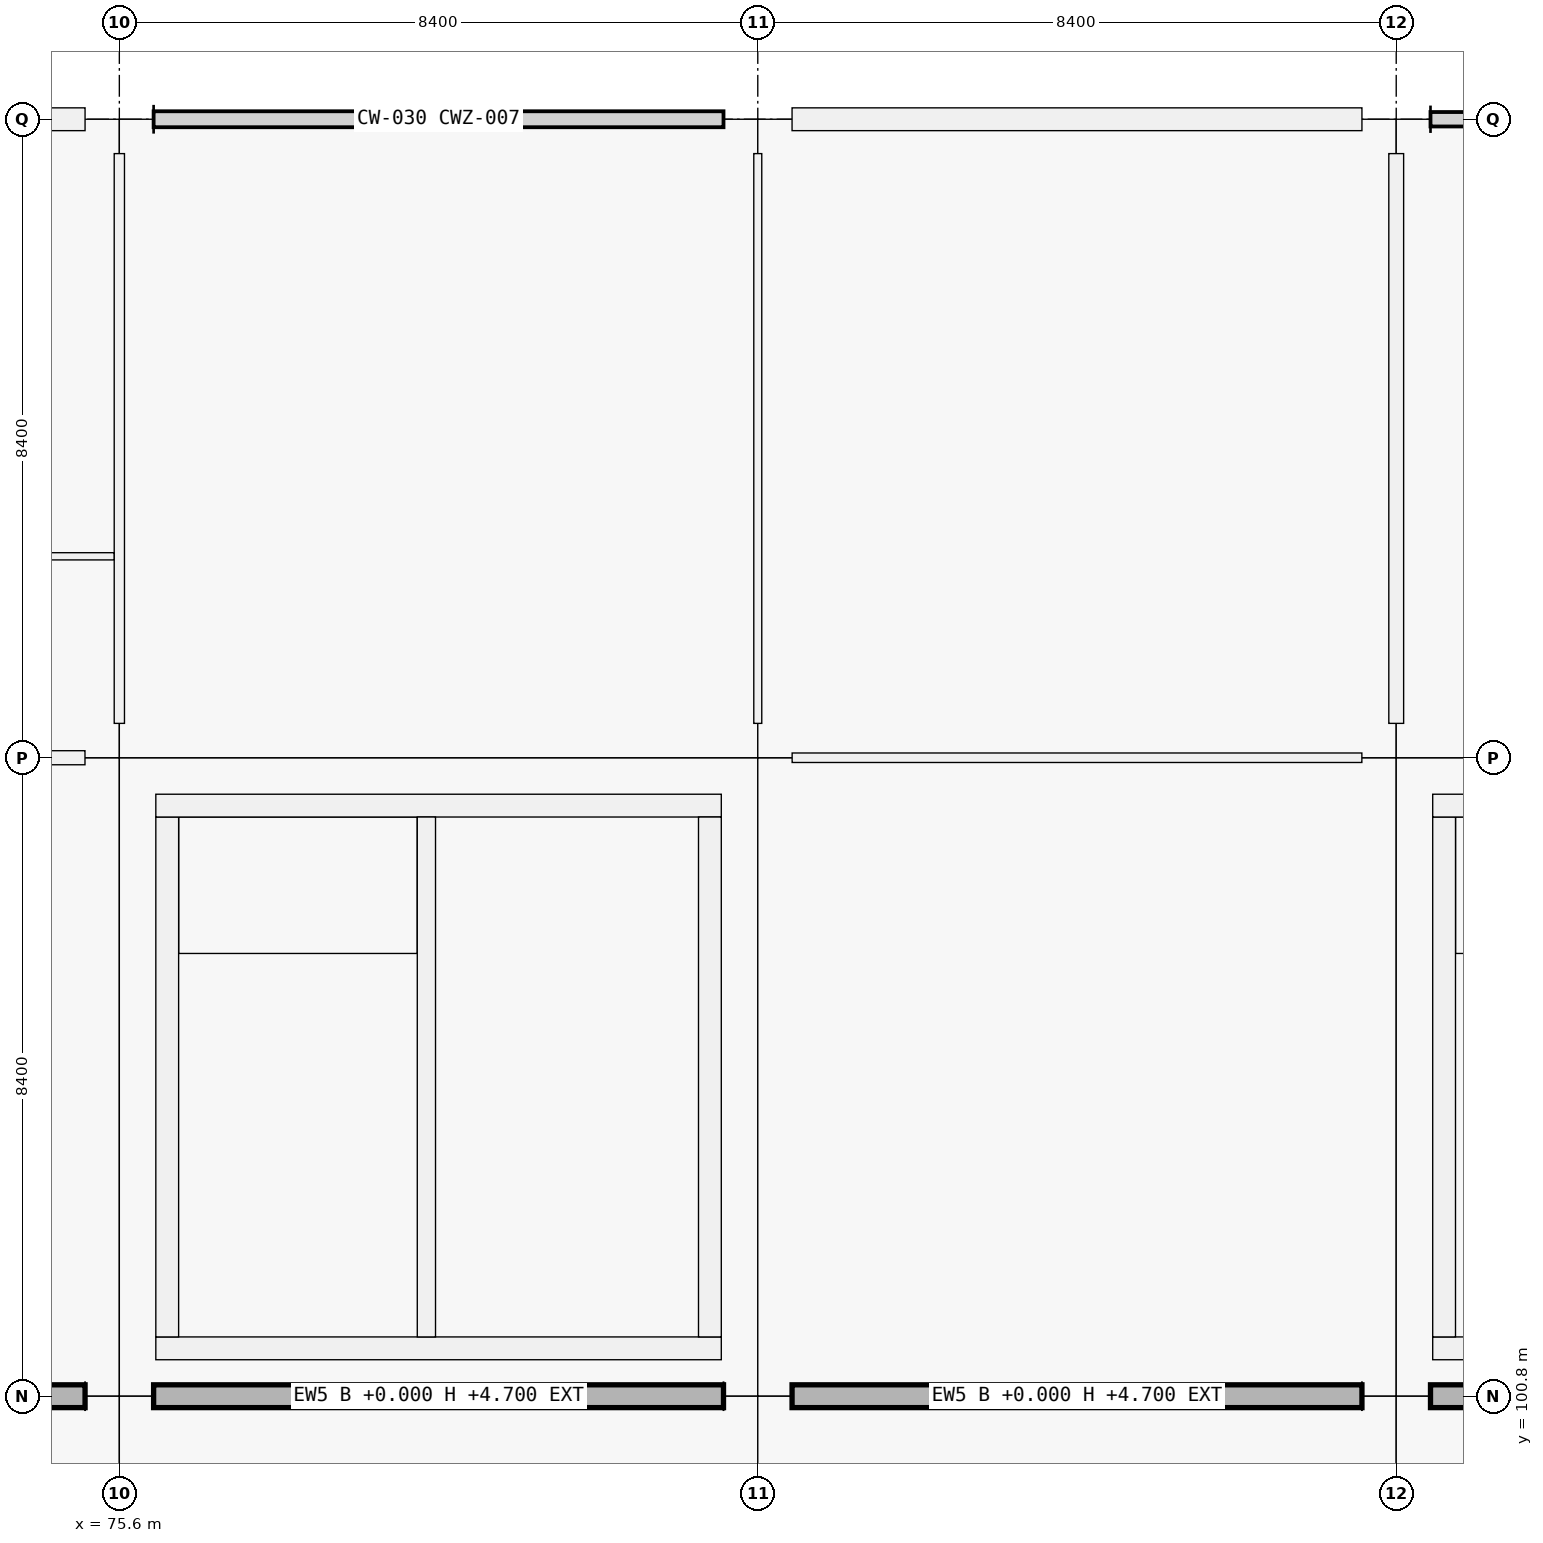
"""IFC4 building model, lengths in metres.
Left out: names, types, materials, properties, quantities, classifications, styles, units other than length and angle.
Written with IfcOpenShell. Run it as: python <this file> out.ifc"""

import sys

from ifc_helpers import new_model, si_unit, direction, frame, frame_2d, origin, origin_2d, place, context, subcontext, project, spatial, rectangle, extrude, element, fill, save


model = new_model("IFC4")
c1 = context("Model", 3, precision=1e-05, world=origin(), true_north=direction((0.0, 1.0)))
c2 = subcontext(c1, "Body", "Model", "MODEL_VIEW")
j1 = project(units=[si_unit("LENGTHUNIT", "METRE"), si_unit("PLANEANGLEUNIT", "RADIAN")], contexts=[c1])
p1 = place(None, origin())
s1 = spatial("IfcSite", under=j1, at=p1, CompositionType="ELEMENT")
p2 = place(p1, origin())
s2 = spatial("IfcBuilding", under=s1, at=p2, CompositionType="ELEMENT")
p3 = place(p2, origin())
s3 = spatial("IfcBuildingStorey", under=s2, at=p3, CompositionType="ELEMENT", Elevation=0.0)
for number, where, z_axis, x_axis in (
    (1, (75.6, 100.8, 0.0), (0.0, 0.0, 1.0), (1.0, 0.0, 0.0)),
    (2, (75.6, 109.2, 0.0), (0.0, 0.0, 1.0), (1.0, 0.0, 0.0)),
    (3, (75.6, 117.6, 0.0), (0.0, 0.0, 1.0), (1.0, 0.0, 0.0)),
    (4, (84.0, 100.8, 0.0), (0.0, 0.0, 1.0), (1.0, 0.0, 0.0)),
    (5, (84.0, 109.2, 0.0), (0.0, 0.0, 1.0), (1.0, 0.0, 0.0)),
    (6, (84.0, 117.6, 0.0), (0.0, 0.0, 1.0), (1.0, 0.0, 0.0)),
    (7, (92.4, 100.8, 0.0), (0.0, 0.0, 1.0), (1.0, 0.0, 0.0)),
    (8, (92.4, 109.2, 0.0), (0.0, 0.0, 1.0), (1.0, 0.0, 0.0)),
    (9, (92.4, 117.6, 0.0), (0.0, 0.0, 1.0), (1.0, 0.0, 0.0)),
):
    element("IfcColumn", number, at=place(p3, frame(where, z_axis=z_axis, x_axis=x_axis)), inside=s3, PredefinedType="COLUMN", context=c2, shape_type="SweptSolid", body=[
        extrude(rectangle(XDim=0.9, YDim=0.9, at=origin_2d()), origin(), (0.0, 0.0, 1.0), 5.76),
    ])
p4 = place(p3, frame((75.149, 100.8, 0.0), z_axis=(0.0, 0.0, 1.0), x_axis=(-1.0, 0.0, 0.0)))
e10 = element("IfcWall", 10, at=p4, inside=s3, PredefinedType="SOLIDWALL", context=c2, shape_type="SweptSolid", body=[
    extrude(rectangle(XDim=7.498, YDim=0.3, at=frame_2d((3.749, 0.0))), origin(), (0.0, 0.0, 1.0), 4.7),
])
p5 = place(p4, frame((3.199, 0.0, 0.9)))
e11 = element("IfcOpeningElement", 11, at=p5, cuts=e10, PredefinedType="OPENING", context=c2, shape_type="SweptSolid", body=[
    extrude(rectangle(XDim=1.1, YDim=1.5, at=frame_2d((0.55, 0.75))), frame((0.0, 0.15, 0.0), z_axis=(0.0, -1.0, 0.0), x_axis=(1.0, 0.0, 0.0)), (0.0, 0.0, 1.0), 0.3),
])
p6 = place(p3, frame((67.651, 117.6, 0.0), z_axis=(0.0, 0.0, 1.0), x_axis=(1.0, 0.0, 0.0)))
e12 = element("IfcWall", 12, at=p6, inside=s3, PredefinedType="SOLIDWALL", context=c2, shape_type="SweptSolid", body=[
    extrude(rectangle(XDim=7.498, YDim=0.3, at=frame_2d((3.749, 0.0))), origin(), (0.0, 0.0, 1.0), 4.7),
])
p7 = place(p6, frame((2.999, 0.0, 0.9)))
e13 = element("IfcOpeningElement", 13, at=p7, cuts=e12, PredefinedType="OPENING", context=c2, shape_type="SweptSolid", body=[
    extrude(rectangle(XDim=1.5, YDim=1.2, at=frame_2d((0.75, 0.6))), frame((0.0, 0.15, 0.0), z_axis=(0.0, -1.0, 0.0), x_axis=(1.0, 0.0, 0.0)), (0.0, 0.0, 1.0), 0.3),
])
p8 = place(p3, frame((83.549, 100.8, 0.0), z_axis=(0.0, 0.0, 1.0), x_axis=(-1.0, 0.0, 0.0)))
e14 = element("IfcWall", 14, at=p8, inside=s3, PredefinedType="SOLIDWALL", context=c2, shape_type="SweptSolid", body=[
    extrude(rectangle(XDim=7.498, YDim=0.3, at=frame_2d((3.749, 0.0))), origin(), (0.0, 0.0, 1.0), 4.7),
])
p9 = place(p3, frame((91.949, 100.8, 0.0), z_axis=(0.0, 0.0, 1.0), x_axis=(-1.0, 0.0, 0.0)))
e15 = element("IfcWall", 15, at=p9, inside=s3, PredefinedType="SOLIDWALL", context=c2, shape_type="SweptSolid", body=[
    extrude(rectangle(XDim=7.498, YDim=0.3, at=frame_2d((3.749, 0.0))), origin(), (0.0, 0.0, 1.0), 4.7),
])
p10 = place(p9, frame((2.899, 0.0, 0.9)))
e16 = element("IfcOpeningElement", 16, at=p10, cuts=e15, PredefinedType="OPENING", context=c2, shape_type="SweptSolid", body=[
    extrude(rectangle(XDim=1.7, YDim=1.85, at=frame_2d((0.85, 0.925))), frame((0.0, 0.15, 0.0), z_axis=(0.0, -1.0, 0.0), x_axis=(1.0, 0.0, 0.0)), (0.0, 0.0, 1.0), 0.3),
])
p11 = place(p3, frame((84.451, 117.6, 0.0), z_axis=(0.0, 0.0, 1.0), x_axis=(1.0, 0.0, 0.0)))
e17 = element("IfcWall", 17, at=p11, inside=s3, PredefinedType="SOLIDWALL", context=c2, shape_type="SweptSolid", body=[
    extrude(rectangle(XDim=7.498, YDim=0.3, at=frame_2d((3.749, 0.0))), origin(), (0.0, 0.0, 1.0), 4.7),
])
p12 = place(p11, frame((2.599, 0.0, 0.0)))
e18 = element("IfcOpeningElement", 18, at=p12, cuts=e17, PredefinedType="OPENING", context=c2, shape_type="SweptSolid", body=[
    extrude(rectangle(XDim=2.3, YDim=2.3, at=frame_2d((1.15, 1.15))), frame((0.0, 0.15, 0.0), z_axis=(0.0, -1.0, 0.0), x_axis=(1.0, 0.0, 0.0)), (0.0, 0.0, 1.0), 0.3),
])
p13 = place(p3, frame((100.349, 100.8, 0.0), z_axis=(0.0, 0.0, 1.0), x_axis=(-1.0, 0.0, 0.0)))
e19 = element("IfcWall", 19, at=p13, inside=s3, PredefinedType="SOLIDWALL", context=c2, shape_type="SweptSolid", body=[
    extrude(rectangle(XDim=7.498, YDim=0.3, at=frame_2d((3.749, 0.0))), origin(), (0.0, 0.0, 1.0), 4.7),
])
p14 = place(p3, frame((83.52, 101.43, 0.0), z_axis=(0.0, 0.0, 1.0), x_axis=(-1.0, 0.0, 0.0)))
e20 = element("IfcWall", 20, at=p14, inside=s3, PredefinedType="SHEAR", context=c2, shape_type="SweptSolid", body=[
    extrude(rectangle(XDim=7.44, YDim=0.3, at=frame_2d((3.72, 0.0))), origin(), (0.0, 0.0, 1.0), 5.76),
])
p15 = place(p3, frame((76.23, 101.58, 0.0), z_axis=(0.0, 0.0, 1.0), x_axis=(0.0, 1.0, 0.0)))
e21 = element("IfcWall", 21, at=p15, inside=s3, PredefinedType="SHEAR", context=c2, shape_type="SweptSolid", body=[
    extrude(rectangle(XDim=6.84, YDim=0.3, at=frame_2d((3.42, 0.0))), origin(), (0.0, 0.0, 1.0), 5.76),
])
p16 = place(p3, frame((76.08, 108.57, 0.0), z_axis=(0.0, 0.0, 1.0), x_axis=(1.0, 0.0, 0.0)))
e22 = element("IfcWall", 22, at=p16, inside=s3, PredefinedType="SHEAR", context=c2, shape_type="SweptSolid", body=[
    extrude(rectangle(XDim=7.44, YDim=0.3, at=frame_2d((3.72, 0.0))), origin(), (0.0, 0.0, 1.0), 5.76),
])
p17 = place(p3, frame((83.37, 108.42, 0.0), z_axis=(0.0, 0.0, 1.0), x_axis=(0.0, -1.0, 0.0)))
e23 = element("IfcWall", 23, at=p17, inside=s3, PredefinedType="SHEAR", context=c2, shape_type="SweptSolid", body=[
    extrude(rectangle(XDim=6.84, YDim=0.3, at=frame_2d((3.42, 0.0))), origin(), (0.0, 0.0, 1.0), 5.76),
])
p18 = place(p17, frame((3.97, 0.0, 0.0)))
e24 = element("IfcOpeningElement", 24, at=p18, cuts=e23, PredefinedType="OPENING", context=c2, shape_type="SweptSolid", body=[
    extrude(rectangle(XDim=1.5, YDim=2.15, at=frame_2d((0.75, 1.075))), frame((0.0, 0.15, 0.0), z_axis=(0.0, -1.0, 0.0), x_axis=(1.0, 0.0, 0.0)), (0.0, 0.0, 1.0), 0.3),
])
p19 = place(p3, frame((79.64, 101.58, 0.0), z_axis=(0.0, 0.0, 1.0), x_axis=(0.0, 1.0, 0.0)))
e25 = element("IfcWall", 25, at=p19, inside=s3, PredefinedType="SHEAR", context=c2, shape_type="SweptSolid", body=[
    extrude(rectangle(XDim=6.84, YDim=0.24, at=frame_2d((3.42, 0.0))), origin(), (0.0, 0.0, 1.0), 5.76),
])
p20 = place(p19, frame((0.12, 0.0, 0.0)))
e26 = element("IfcOpeningElement", 26, at=p20, cuts=e25, PredefinedType="OPENING", context=c2, shape_type="SweptSolid", body=[
    extrude(rectangle(XDim=1.0, YDim=2.15, at=frame_2d((0.5, 1.075))), frame((0.0, 0.12, 0.0), z_axis=(0.0, -1.0, 0.0), x_axis=(1.0, 0.0, 0.0)), (0.0, 0.0, 1.0), 0.24),
])
p21 = place(p3, frame((100.32, 101.43, 0.0), z_axis=(0.0, 0.0, 1.0), x_axis=(-1.0, 0.0, 0.0)))
e27 = element("IfcWall", 27, at=p21, inside=s3, PredefinedType="SHEAR", context=c2, shape_type="SweptSolid", body=[
    extrude(rectangle(XDim=7.44, YDim=0.3, at=frame_2d((3.72, 0.0))), origin(), (0.0, 0.0, 1.0), 5.76),
])
p22 = place(p3, frame((93.03, 101.58, 0.0), z_axis=(0.0, 0.0, 1.0), x_axis=(0.0, 1.0, 0.0)))
e28 = element("IfcWall", 28, at=p22, inside=s3, PredefinedType="SHEAR", context=c2, shape_type="SweptSolid", body=[
    extrude(rectangle(XDim=6.84, YDim=0.3, at=frame_2d((3.42, 0.0))), origin(), (0.0, 0.0, 1.0), 5.76),
])
p23 = place(p3, frame((92.88, 108.57, 0.0), z_axis=(0.0, 0.0, 1.0), x_axis=(1.0, 0.0, 0.0)))
e29 = element("IfcWall", 29, at=p23, inside=s3, PredefinedType="SHEAR", context=c2, shape_type="SweptSolid", body=[
    extrude(rectangle(XDim=7.44, YDim=0.3, at=frame_2d((3.72, 0.0))), origin(), (0.0, 0.0, 1.0), 5.76),
])
p24 = place(p3, frame((67.652, 109.2, 0.0), z_axis=(0.0, 0.0, 1.0), x_axis=(1.0, 0.0, 0.0)))
e30 = element("IfcWall", 30, at=p24, inside=s3, PredefinedType="PARTITIONING", context=c2, shape_type="SweptSolid", body=[
    extrude(rectangle(XDim=7.496, YDim=0.185, at=frame_2d((3.748, 0.0))), origin(), (0.0, 0.0, 1.0), 3.66),
])
p25 = place(p3, frame((84.452, 109.2, 0.0), z_axis=(0.0, 0.0, 1.0), x_axis=(1.0, 0.0, 0.0)))
e31 = element("IfcWall", 31, at=p25, inside=s3, PredefinedType="PARTITIONING", context=c2, shape_type="SweptSolid", body=[
    extrude(rectangle(XDim=7.496, YDim=0.125, at=frame_2d((3.748, 0.0))), origin(), (0.0, 0.0, 1.0), 3.66),
])
p26 = place(p25, frame((3.218, 0.0, 0.0)))
e32 = element("IfcOpeningElement", 32, at=p26, cuts=e31, PredefinedType="OPENING", context=c2, shape_type="SweptSolid", body=[
    extrude(rectangle(XDim=1.06, YDim=2.25, at=frame_2d((0.53, 1.125))), frame((0.0, 0.062, 0.0), z_axis=(0.0, -1.0, 0.0), x_axis=(1.0, 0.0, 0.0)), (0.0, 0.0, 1.0), 0.125),
])
p27 = place(p3, frame((75.6, 109.652, 0.0), z_axis=(0.0, 0.0, 1.0), x_axis=(0.0, 1.0, 0.0)))
e33 = element("IfcWall", 33, at=p27, inside=s3, PredefinedType="PARTITIONING", context=c2, shape_type="SweptSolid", body=[
    extrude(rectangle(XDim=7.496, YDim=0.135, at=frame_2d((3.748, 0.0))), origin(), (0.0, 0.0, 1.0), 3.66),
])
p28 = place(p3, frame((84.0, 109.652, 0.0), z_axis=(0.0, 0.0, 1.0), x_axis=(0.0, 1.0, 0.0)))
e34 = element("IfcWall", 34, at=p28, inside=s3, PredefinedType="PARTITIONING", context=c2, shape_type="SweptSolid", body=[
    extrude(rectangle(XDim=7.496, YDim=0.105, at=frame_2d((3.748, 0.0))), origin(), (0.0, 0.0, 1.0), 3.66),
])
p29 = place(p28, frame((3.288, 0.0, 0.0)))
e35 = element("IfcOpeningElement", 35, at=p29, cuts=e34, PredefinedType="OPENING", context=c2, shape_type="SweptSolid", body=[
    extrude(rectangle(XDim=0.92, YDim=2.15, at=frame_2d((0.46, 1.075))), frame((0.0, 0.052, 0.0), z_axis=(0.0, -1.0, 0.0), x_axis=(1.0, 0.0, 0.0)), (0.0, 0.0, 1.0), 0.105),
])
p30 = place(p3, frame((92.4, 109.652, 0.0), z_axis=(0.0, 0.0, 1.0), x_axis=(0.0, 1.0, 0.0)))
e36 = element("IfcWall", 36, at=p30, inside=s3, PredefinedType="PARTITIONING", context=c2, shape_type="SweptSolid", body=[
    extrude(rectangle(XDim=7.496, YDim=0.195, at=frame_2d((3.748, 0.0))), origin(), (0.0, 0.0, 1.0), 3.66),
])
p31 = place(p30, frame((3.223, 0.0, 0.0)))
e37 = element("IfcOpeningElement", 37, at=p31, cuts=e36, PredefinedType="OPENING", context=c2, shape_type="SweptSolid", body=[
    extrude(rectangle(XDim=1.05, YDim=2.12, at=frame_2d((0.525, 1.06))), frame((0.0, 0.098, 0.0), z_axis=(0.0, -1.0, 0.0), x_axis=(1.0, 0.0, 0.0)), (0.0, 0.0, 1.0), 0.195),
])
p32 = place(p3, frame((67.284, 111.85, 0.0), z_axis=(0.0, 0.0, 1.0), x_axis=(1.0, 0.0, 0.0)))
e38 = element("IfcWall", 38, at=p32, inside=s3, PredefinedType="PARTITIONING", context=c2, shape_type="SweptSolid", body=[
    extrude(rectangle(XDim=8.246, YDim=0.095, at=frame_2d((4.123, 0.0))), origin(), (0.0, 0.0, 1.0), 3.66),
])
p33 = place(p10, origin())
e39 = element("IfcWindow", 39, at=p33, inside=s3, PartitioningType="SINGLE_PANEL", PredefinedType="WINDOW", context=c2, shape_type="SweptSolid", body=[
    extrude(rectangle(XDim=1.7, YDim=1.85, at=frame_2d((0.85, 0.925))), frame((0.0, 0.03, 0.0), z_axis=(0.0, -1.0, 0.0), x_axis=(1.0, 0.0, 0.0)), (0.0, 0.0, 1.0), 0.06),
])
fill(e16, e39)
p34 = place(p12, origin())
e40 = element("IfcDoor", 40, at=p34, inside=s3, OperationType="DOUBLE_DOOR_SINGLE_SWING", PredefinedType="DOOR", context=c2, shape_type="SweptSolid", body=[
    extrude(rectangle(XDim=2.3, YDim=2.3, at=frame_2d((1.15, 1.15))), frame((0.0, 0.025, 0.0), z_axis=(0.0, -1.0, 0.0), x_axis=(1.0, 0.0, 0.0)), (0.0, 0.0, 1.0), 0.05),
])
fill(e18, e40)
p35 = place(p20, origin())
e41 = element("IfcDoor", 41, at=p35, inside=s3, OperationType="SINGLE_SWING_RIGHT", PredefinedType="DOOR", context=c2, shape_type="SweptSolid", body=[
    extrude(rectangle(XDim=1.0, YDim=2.15, at=frame_2d((0.5, 1.075))), frame((0.0, 0.025, 0.0), z_axis=(0.0, -1.0, 0.0), x_axis=(1.0, 0.0, 0.0)), (0.0, 0.0, 1.0), 0.05),
])
fill(e26, e41)
p36 = place(p18, origin())
e42 = element("IfcDoor", 42, at=p36, inside=s3, OperationType="DOUBLE_DOOR_SINGLE_SWING", PredefinedType="DOOR", context=c2, shape_type="SweptSolid", body=[
    extrude(rectangle(XDim=1.5, YDim=2.15, at=frame_2d((0.75, 1.075))), frame((0.0, 0.025, 0.0), z_axis=(0.0, -1.0, 0.0), x_axis=(1.0, 0.0, 0.0)), (0.0, 0.0, 1.0), 0.05),
])
fill(e24, e42)
p37 = place(p26, origin())
e43 = element("IfcDoor", 43, at=p37, inside=s3, OperationType="SINGLE_SWING_LEFT", PredefinedType="DOOR", context=c2, shape_type="SweptSolid", body=[
    extrude(rectangle(XDim=1.06, YDim=2.25, at=frame_2d((0.53, 1.125))), frame((0.0, 0.025, 0.0), z_axis=(0.0, -1.0, 0.0), x_axis=(1.0, 0.0, 0.0)), (0.0, 0.0, 1.0), 0.05),
])
fill(e32, e43)
p38 = place(p29, origin())
e44 = element("IfcDoor", 44, at=p38, inside=s3, OperationType="SINGLE_SWING_LEFT", PredefinedType="DOOR", context=c2, shape_type="SweptSolid", body=[
    extrude(rectangle(XDim=0.92, YDim=2.15, at=frame_2d((0.46, 1.075))), frame((0.0, 0.025, 0.0), z_axis=(0.0, -1.0, 0.0), x_axis=(1.0, 0.0, 0.0)), (0.0, 0.0, 1.0), 0.05),
])
fill(e35, e44)
p39 = place(p31, origin())
e45 = element("IfcDoor", 45, at=p39, inside=s3, OperationType="SINGLE_SWING_RIGHT", PredefinedType="DOOR", context=c2, shape_type="SweptSolid", body=[
    extrude(rectangle(XDim=1.05, YDim=2.12, at=frame_2d((0.525, 1.06))), frame((0.0, 0.025, 0.0), z_axis=(0.0, -1.0, 0.0), x_axis=(1.0, 0.0, 0.0)), (0.0, 0.0, 1.0), 0.05),
])
fill(e37, e45)
save(model, sys.argv[1])
